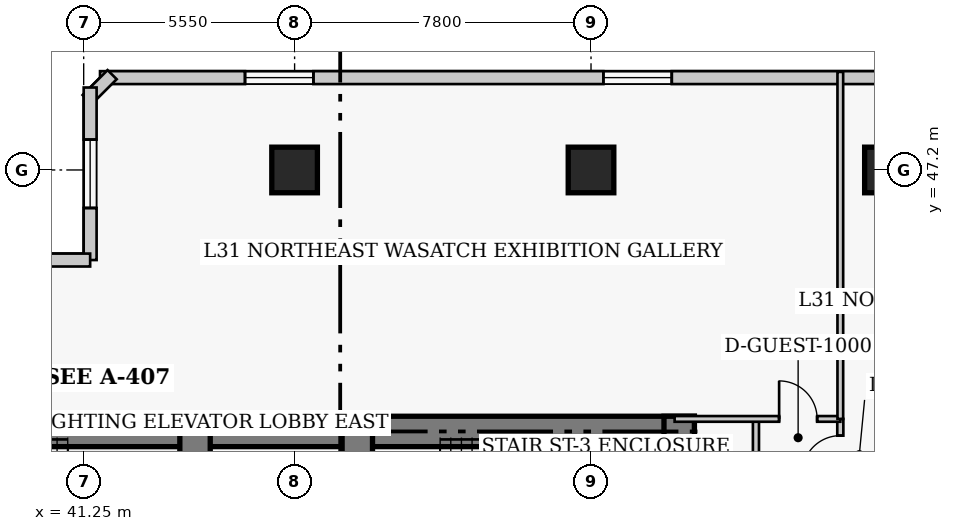
"""IFC4 building model, lengths in metres.
Left out: names, types, materials, properties, quantities, classifications, styles, units other than length and angle.
Written with IfcOpenShell. Run it as: python <this file> out.ifc"""

import sys

from ifc_helpers import new_model, si_unit, direction, frame, frame_2d, origin, origin_2d, place, context, subcontext, project, spatial, rectangle, extrude, element, fill, save


model = new_model("IFC4")
c1 = context("Model", 3, precision=1e-05, world=origin(), true_north=direction((0.0, 1.0)))
c2 = subcontext(c1, "Body", "Model", "MODEL_VIEW")
j1 = project(units=[si_unit("LENGTHUNIT", "METRE"), si_unit("PLANEANGLEUNIT", "RADIAN")], contexts=[c1])
p1 = place(None, origin())
s1 = spatial("IfcSite", under=j1, at=p1, CompositionType="ELEMENT")
p2 = place(p1, origin())
s2 = spatial("IfcBuilding", under=s1, at=p2, CompositionType="ELEMENT")
p3 = place(p2, frame((0.0, 0.0, 126.0)))
s3 = spatial("IfcBuildingStorey", under=s2, at=p3, CompositionType="ELEMENT", Elevation=126.0)
p4 = place(p3, frame((35.85, 40.32, 0.0), z_axis=(0.0, 0.0, 1.0), x_axis=(1.0, 0.0, 0.0)))
e1 = element("IfcWall", 1, at=p4, inside=s3, PredefinedType="SHEAR", context=c2, shape_type="SweptSolid", body=[
    extrude(rectangle(XDim=12.6, YDim=0.8, at=frame_2d((6.3, 0.0))), origin(), (0.0, 0.0, 1.0), 3.8),
])
p5 = place(p3, frame((48.45, 40.32, 0.0), z_axis=(0.0, 0.0, 1.0), x_axis=(1.0, 0.0, 0.0)))
e2 = element("IfcWall", 2, at=p5, inside=s3, PredefinedType="SHEAR", context=c2, shape_type="SweptSolid", body=[
    extrude(rectangle(XDim=8.87, YDim=0.8, at=frame_2d((4.435, 0.0))), origin(), (0.0, 0.0, 1.0), 3.8),
])
p6 = place(p3, frame((56.92, 27.05, 0.0), z_axis=(0.0, 0.0, 1.0), x_axis=(0.0, 1.0, 0.0)))
e3 = element("IfcWall", 3, at=p6, inside=s3, PredefinedType="SHEAR", context=c2, shape_type="SweptSolid", body=[
    extrude(rectangle(XDim=13.67, YDim=0.8, at=frame_2d((6.835, 0.0))), origin(), (0.0, 0.0, 1.0), 3.8),
])
p7 = place(p3, frame((44.18, 36.37, 0.0), z_axis=(0.0, 0.0, 1.0), x_axis=(0.0, 1.0, 0.0)))
e4 = element("IfcWall", 4, at=p7, inside=s3, PredefinedType="SHEAR", context=c2, shape_type="SweptSolid", body=[
    extrude(rectangle(XDim=3.95, YDim=0.8, at=frame_2d((1.975, 0.0))), origin(), (0.0, 0.0, 1.0), 3.8),
])
p8 = place(p3, frame((48.45, 32.35, 0.0), z_axis=(0.0, 0.0, 1.0), x_axis=(0.0, 1.0, 0.0)))
e5 = element("IfcWall", 5, at=p8, inside=s3, PredefinedType="SHEAR", context=c2, shape_type="SweptSolid", body=[
    extrude(rectangle(XDim=7.97, YDim=0.8, at=frame_2d((3.985, 0.0))), origin(), (0.0, 0.0, 1.0), 3.8),
])
p9 = place(p8, frame((5.85, 0.0, 0.0)))
e6 = element("IfcOpeningElement", 6, at=p9, cuts=e5, PredefinedType="OPENING", context=c2, shape_type="SweptSolid", body=[
    extrude(rectangle(XDim=1.1, YDim=2.15, at=frame_2d((0.55, 1.075))), frame((0.0, 0.41, 0.0), z_axis=(0.0, -1.0, 0.0), x_axis=(1.0, 0.0, 0.0)), (0.0, 0.0, 1.0), 0.82),
])
for number, where, z_axis, x_axis in (
    (7, (46.8, 47.2, 0.0), (0.0, 0.0, 1.0), (1.0, 0.0, 0.0)),
    (8, (54.6, 47.2, 0.0), (0.0, 0.0, 1.0), (1.0, 0.0, 0.0)),
    (9, (62.4, 47.2, 0.0), (0.0, 0.0, 1.0), (1.0, 0.0, 0.0)),
):
    element("IfcColumn", number, at=place(p3, frame(where, z_axis=z_axis, x_axis=x_axis)), inside=s3, PredefinedType="COLUMN", context=c2, shape_type="SweptSolid", body=[
        extrude(rectangle(XDim=1.2, YDim=1.2, at=origin_2d()), origin(), (0.0, 0.0, 1.0), 3.8),
    ])
p10 = place(p3, frame((69.97, 49.63, 0.0), z_axis=(0.0, 0.0, 1.0), x_axis=(-1.0, 0.0, 0.0)))
e10 = element("IfcWall", 10, at=p10, inside=s3, PredefinedType="SOLIDWALL", context=c2, shape_type="SweptSolid", body=[
    extrude(rectangle(XDim=28.29, YDim=0.34, at=frame_2d((14.145, 0.0))), origin(), (0.0, 0.0, 1.0), 3.46),
])
p11 = place(p10, frame((3.815, 0.0, 0.85)))
e11 = element("IfcOpeningElement", 11, at=p11, cuts=e10, PredefinedType="OPENING", context=c2, shape_type="SweptSolid", body=[
    extrude(rectangle(XDim=1.8, YDim=1.8, at=frame_2d((0.9, 0.9))), frame((0.0, 0.18, 0.0), z_axis=(0.0, -1.0, 0.0), x_axis=(1.0, 0.0, 0.0)), (0.0, 0.0, 1.0), 0.36),
])
p12 = place(p10, frame((13.245, 0.0, 0.85)))
e12 = element("IfcOpeningElement", 12, at=p12, cuts=e10, PredefinedType="OPENING", context=c2, shape_type="SweptSolid", body=[
    extrude(rectangle(XDim=1.8, YDim=1.8, at=frame_2d((0.9, 0.9))), frame((0.0, 0.18, 0.0), z_axis=(0.0, -1.0, 0.0), x_axis=(1.0, 0.0, 0.0)), (0.0, 0.0, 1.0), 0.36),
])
p13 = place(p10, frame((22.675, 0.0, 0.85)))
e13 = element("IfcOpeningElement", 13, at=p13, cuts=e10, PredefinedType="OPENING", context=c2, shape_type="SweptSolid", body=[
    extrude(rectangle(XDim=1.8, YDim=1.8, at=frame_2d((0.9, 0.9))), frame((0.0, 0.18, 0.0), z_axis=(0.0, -1.0, 0.0), x_axis=(1.0, 0.0, 0.0)), (0.0, 0.0, 1.0), 0.36),
])
p14 = place(p3, frame((41.999, 49.708, 0.0), z_axis=(0.0, 0.0, 1.0), x_axis=(-0.707238225886, -0.706975312048, 0.0)))
e14 = element("IfcWall", 14, at=p14, inside=s3, PredefinedType="SOLIDWALL", context=c2, shape_type="SweptSolid", body=[
    extrude(rectangle(XDim=0.929, YDim=0.34, at=frame_2d((0.464, 0.0))), origin(), (0.0, 0.0, 1.0), 3.46),
])
p15 = place(p3, frame((41.42, 49.37, 0.0), z_axis=(0.0, 0.0, 1.0), x_axis=(0.0, -1.0, 0.0)))
e15 = element("IfcWall", 15, at=p15, inside=s3, PredefinedType="SOLIDWALL", context=c2, shape_type="SweptSolid", body=[
    extrude(rectangle(XDim=4.54, YDim=0.34, at=frame_2d((2.27, 0.0))), origin(), (0.0, 0.0, 1.0), 3.46),
])
p16 = place(p15, frame((1.37, 0.0, 0.85)))
e16 = element("IfcOpeningElement", 16, at=p16, cuts=e15, PredefinedType="OPENING", context=c2, shape_type="SweptSolid", body=[
    extrude(rectangle(XDim=1.8, YDim=1.8, at=frame_2d((0.9, 0.9))), frame((0.0, 0.18, 0.0), z_axis=(0.0, -1.0, 0.0), x_axis=(1.0, 0.0, 0.0)), (0.0, 0.0, 1.0), 0.36),
])
p17 = place(p3, frame((41.42, 44.83, 0.0), z_axis=(0.0, 0.0, 1.0), x_axis=(-1.0, 0.0, 0.0)))
e17 = element("IfcWall", 17, at=p17, inside=s3, PredefinedType="SOLIDWALL", context=c2, shape_type="SweptSolid", body=[
    extrude(rectangle(XDim=4.84, YDim=0.34, at=frame_2d((2.42, 0.0))), origin(), (0.0, 0.0, 1.0), 3.46),
])
p18 = place(p17, frame((1.52, 0.0, 0.85)))
e18 = element("IfcOpeningElement", 18, at=p18, cuts=e17, PredefinedType="OPENING", context=c2, shape_type="SweptSolid", body=[
    extrude(rectangle(XDim=1.8, YDim=1.8, at=frame_2d((0.9, 0.9))), frame((0.0, 0.18, 0.0), z_axis=(0.0, -1.0, 0.0), x_axis=(1.0, 0.0, 0.0)), (0.0, 0.0, 1.0), 0.36),
])
p19 = place(p3, frame((61.16, 11.85, 0.0), z_axis=(0.0, 0.0, 1.0), x_axis=(0.0, 1.0, 0.0)))
e19 = element("IfcWall", 19, at=p19, inside=s3, PredefinedType="PARTITIONING", context=c2, shape_type="SweptSolid", body=[
    extrude(rectangle(XDim=28.8, YDim=0.16, at=frame_2d((14.4, 0.0))), origin(), (0.0, 0.0, 1.0), 3.46),
])
p20 = place(p19, frame((3.6, 0.0, 0.0)))
e20 = element("IfcOpeningElement", 20, at=p20, cuts=e19, PredefinedType="OPENING", context=c2, shape_type="SweptSolid", body=[
    extrude(rectangle(XDim=0.95, YDim=2.1, at=frame_2d((0.475, 1.05))), frame((0.0, 0.09, 0.0), z_axis=(0.0, -1.0, 0.0), x_axis=(1.0, 0.0, 0.0)), (0.0, 0.0, 1.0), 0.18),
])
p21 = place(p19, frame((9.958, 0.0, 0.0)))
e21 = element("IfcOpeningElement", 21, at=p21, cuts=e19, PredefinedType="OPENING", context=c2, shape_type="SweptSolid", body=[
    extrude(rectangle(XDim=0.95, YDim=2.1, at=frame_2d((0.475, 1.05))), frame((0.0, 0.09, 0.0), z_axis=(0.0, -1.0, 0.0), x_axis=(1.0, 0.0, 0.0)), (0.0, 0.0, 1.0), 0.18),
])
p22 = place(p19, frame((27.36, 0.0, 0.0)))
e22 = element("IfcOpeningElement", 22, at=p22, cuts=e19, PredefinedType="OPENING", context=c2, shape_type="SweptSolid", body=[
    extrude(rectangle(XDim=1.0, YDim=2.15, at=frame_2d((0.5, 1.075))), frame((0.0, 0.09, 0.0), z_axis=(0.0, -1.0, 0.0), x_axis=(1.0, 0.0, 0.0)), (0.0, 0.0, 1.0), 0.18),
])
p23 = place(p3, frame((58.94, 25.91, 0.0), z_axis=(0.0, 0.0, 1.0), x_axis=(0.0, 1.0, 0.0)))
e23 = element("IfcWall", 23, at=p23, inside=s3, PredefinedType="PARTITIONING", context=c2, shape_type="SweptSolid", body=[
    extrude(rectangle(XDim=14.74, YDim=0.16, at=frame_2d((7.37, 0.0))), origin(), (0.0, 0.0, 1.0), 3.46),
])
p24 = place(p3, frame((56.8, 40.65, 0.0), z_axis=(0.0, 0.0, 1.0), x_axis=(1.0, 0.0, 0.0)))
e24 = element("IfcWall", 24, at=p24, inside=s3, PredefinedType="PARTITIONING", context=c2, shape_type="SweptSolid", body=[
    extrude(rectangle(XDim=4.36, YDim=0.15, at=frame_2d((2.18, 0.0))), origin(), (0.0, 0.0, 1.0), 3.46),
])
p25 = place(p24, frame((2.75, 0.0, 0.0)))
e25 = element("IfcOpeningElement", 25, at=p25, cuts=e24, PredefinedType="OPENING", context=c2, shape_type="SweptSolid", body=[
    extrude(rectangle(XDim=1.0, YDim=2.15, at=frame_2d((0.5, 1.075))), frame((0.0, 0.085, 0.0), z_axis=(0.0, -1.0, 0.0), x_axis=(1.0, 0.0, 0.0)), (0.0, 0.0, 1.0), 0.17),
])
p26 = place(p3, frame((61.16, 40.65, 0.0), z_axis=(0.0, 0.0, 1.0), x_axis=(0.0, 1.0, 0.0)))
e26 = element("IfcWall", 26, at=p26, inside=s3, PredefinedType="PARTITIONING", context=c2, shape_type="SweptSolid", body=[
    extrude(rectangle(XDim=9.13, YDim=0.15, at=frame_2d((4.565, 0.0))), origin(), (0.0, 0.0, 1.0), 3.46),
])
p27 = place(p12, origin())
e27 = element("IfcWindow", 27, at=p27, inside=s3, PartitioningType="SINGLE_PANEL", PredefinedType="WINDOW", context=c2, shape_type="SweptSolid", body=[
    extrude(rectangle(XDim=1.8, YDim=1.8, at=frame_2d((0.9, 0.9))), frame((0.0, 0.03, 0.0), z_axis=(0.0, -1.0, 0.0), x_axis=(1.0, 0.0, 0.0)), (0.0, 0.0, 1.0), 0.06),
])
fill(e12, e27)
p28 = place(p13, origin())
e28 = element("IfcWindow", 28, at=p28, inside=s3, PartitioningType="SINGLE_PANEL", PredefinedType="WINDOW", context=c2, shape_type="SweptSolid", body=[
    extrude(rectangle(XDim=1.8, YDim=1.8, at=frame_2d((0.9, 0.9))), frame((0.0, 0.03, 0.0), z_axis=(0.0, -1.0, 0.0), x_axis=(1.0, 0.0, 0.0)), (0.0, 0.0, 1.0), 0.06),
])
fill(e13, e28)
p29 = place(p16, origin())
e29 = element("IfcWindow", 29, at=p29, inside=s3, PartitioningType="SINGLE_PANEL", PredefinedType="WINDOW", context=c2, shape_type="SweptSolid", body=[
    extrude(rectangle(XDim=1.8, YDim=1.8, at=frame_2d((0.9, 0.9))), frame((0.0, 0.03, 0.0), z_axis=(0.0, -1.0, 0.0), x_axis=(1.0, 0.0, 0.0)), (0.0, 0.0, 1.0), 0.06),
])
fill(e16, e29)
p30 = place(p25, origin())
e30 = element("IfcDoor", 30, at=p30, inside=s3, OperationType="SINGLE_SWING_LEFT", PredefinedType="DOOR", context=c2, shape_type="SweptSolid", body=[
    extrude(rectangle(XDim=1.0, YDim=2.15, at=frame_2d((0.5, 1.075))), frame((0.0, 0.025, 0.0), z_axis=(0.0, -1.0, 0.0), x_axis=(1.0, 0.0, 0.0)), (0.0, 0.0, 1.0), 0.05),
])
fill(e25, e30)
p31 = place(p22, origin())
e31 = element("IfcDoor", 31, at=p31, inside=s3, OperationType="SINGLE_SWING_LEFT", PredefinedType="DOOR", context=c2, shape_type="SweptSolid", body=[
    extrude(rectangle(XDim=1.0, YDim=2.15, at=frame_2d((0.5, 1.075))), frame((0.0, 0.025, 0.0), z_axis=(0.0, -1.0, 0.0), x_axis=(1.0, 0.0, 0.0)), (0.0, 0.0, 1.0), 0.05),
])
fill(e22, e31)
save(model, sys.argv[1])
